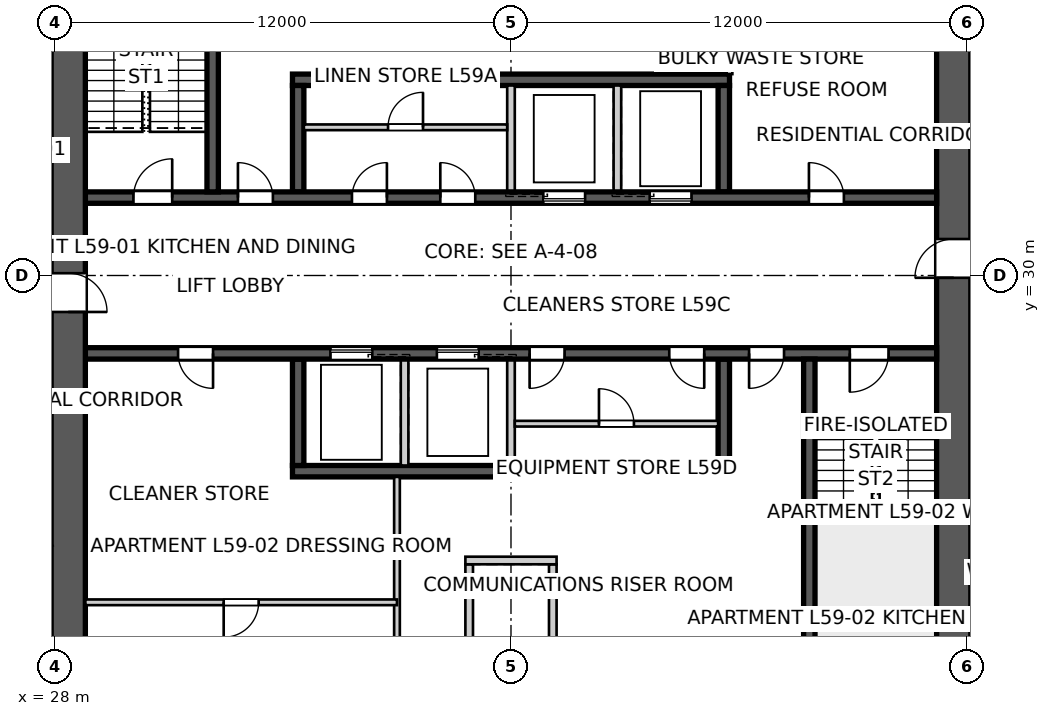
"""IFC4 building model, lengths in metres.
Left out: names, types, materials, properties, quantities, classifications, styles, units other than length and angle.
Written with IfcOpenShell. Run it as: python <this file> out.ifc"""

import sys

from ifc_helpers import new_model, si_unit, direction, frame, frame_2d, origin, place, context, subcontext, project, spatial, polyline, rectangle, outline, extrude, element, fill, save


model = new_model("IFC4")
c1 = context("Model", 3, precision=1e-05, world=origin(), true_north=direction((0.0, 1.0)))
c2 = subcontext(c1, "Body", "Model", "MODEL_VIEW")
j1 = project(units=[si_unit("LENGTHUNIT", "METRE"), si_unit("PLANEANGLEUNIT", "RADIAN")], contexts=[c1])
p1 = place(None, origin())
s1 = spatial("IfcSite", under=j1, at=p1, CompositionType="ELEMENT")
p2 = place(p1, origin())
s2 = spatial("IfcBuilding", under=s1, at=p2, CompositionType="ELEMENT")
p3 = place(p2, frame((0.0, 0.0, 215.0)))
s3 = spatial("IfcBuildingStorey", under=s2, at=p3, CompositionType="ELEMENT", Elevation=215.0)
p4 = place(p3, frame((51.65, 18.8, 0.0), z_axis=(0.0, 0.0, 1.0), x_axis=(0.0, 1.0, 0.0)))
e1 = element("IfcWall", 1, at=p4, inside=s3, PredefinedType="SHEAR", context=c2, shape_type="SweptSolid", body=[
    extrude(outline(polyline([(0.0, -0.45), (22.4, -0.45), (22.4, -0.025), (22.85, -0.025), (22.85, 0.025), (22.4, 0.025), (22.4, 0.45), (0.0, 0.45), (0.0, 0.025), (-0.45, 0.025), (-0.45, -0.025), (0.0, -0.025), (0.0, -0.45)])), origin(), (0.0, 0.0, 1.0), 3.4),
])
p5 = place(p4, frame((11.14, 0.0, 0.0)))
e2 = element("IfcOpeningElement", 2, at=p5, cuts=e1, PredefinedType="OPENING", context=c2, shape_type="SweptSolid", body=[
    extrude(rectangle(XDim=1.02, YDim=2.4, at=frame_2d((0.51, 1.2))), frame((0.0, 0.46, 0.0), z_axis=(0.0, -1.0, 0.0), x_axis=(1.0, 0.0, 0.0)), (0.0, 0.0, 1.0), 0.92),
])
p6 = place(p3, frame((28.35, 41.2, 0.0), z_axis=(0.0, 0.0, 1.0), x_axis=(0.0, -1.0, 0.0)))
e3 = element("IfcWall", 3, at=p6, inside=s3, PredefinedType="SHEAR", context=c2, shape_type="SweptSolid", body=[
    extrude(outline(polyline([(0.0, -0.45), (22.4, -0.45), (22.4, -0.025), (22.85, -0.025), (22.85, 0.025), (22.4, 0.025), (22.4, 0.45), (0.0, 0.45), (0.0, 0.025), (-0.45, 0.025), (-0.45, -0.025), (0.0, -0.025), (0.0, -0.45)])), origin(), (0.0, 0.0, 1.0), 3.4),
])
p7 = place(p6, frame((11.14, 0.0, 0.0)))
e4 = element("IfcOpeningElement", 4, at=p7, cuts=e3, PredefinedType="OPENING", context=c2, shape_type="SweptSolid", body=[
    extrude(rectangle(XDim=1.02, YDim=2.4, at=frame_2d((0.51, 1.2))), frame((0.0, 0.46, 0.0), z_axis=(0.0, -1.0, 0.0), x_axis=(1.0, 0.0, 0.0)), (0.0, 0.0, 1.0), 0.92),
])
p8 = place(p3, frame((28.8, 32.05, 0.0), z_axis=(0.0, 0.0, 1.0), x_axis=(1.0, 0.0, 0.0)))
e5 = element("IfcWall", 5, at=p8, inside=s3, PredefinedType="SHEAR", context=c2, shape_type="SweptSolid", body=[
    extrude(rectangle(XDim=22.4, YDim=0.3, at=frame_2d((11.2, 0.0))), origin(), (0.0, 0.0, 1.0), 3.4),
])
p9 = place(p8, frame((19.04, 0.0, 0.0)))
e6 = element("IfcOpeningElement", 6, at=p9, cuts=e5, PredefinedType="OPENING", context=c2, shape_type="SweptSolid", body=[
    extrude(rectangle(XDim=0.92, YDim=2.1, at=frame_2d((0.46, 1.05))), frame((0.0, 0.16, 0.0), z_axis=(0.0, -1.0, 0.0), x_axis=(1.0, 0.0, 0.0)), (0.0, 0.0, 1.0), 0.32),
])
p10 = place(p8, frame((1.265, 0.0, 0.0)))
e7 = element("IfcOpeningElement", 7, at=p10, cuts=e5, PredefinedType="OPENING", context=c2, shape_type="SweptSolid", body=[
    extrude(rectangle(XDim=1.02, YDim=2.1, at=frame_2d((0.51, 1.05))), frame((0.0, 0.16, 0.0), z_axis=(0.0, -1.0, 0.0), x_axis=(1.0, 0.0, 0.0)), (0.0, 0.0, 1.0), 0.32),
])
p11 = place(p8, frame((4.015, 0.0, 0.0)))
e8 = element("IfcOpeningElement", 8, at=p11, cuts=e5, PredefinedType="OPENING", context=c2, shape_type="SweptSolid", body=[
    extrude(rectangle(XDim=0.92, YDim=2.1, at=frame_2d((0.46, 1.05))), frame((0.0, 0.16, 0.0), z_axis=(0.0, -1.0, 0.0), x_axis=(1.0, 0.0, 0.0)), (0.0, 0.0, 1.0), 0.32),
])
p12 = place(p8, frame((7.015, 0.0, 0.0)))
e9 = element("IfcOpeningElement", 9, at=p12, cuts=e5, PredefinedType="OPENING", context=c2, shape_type="SweptSolid", body=[
    extrude(rectangle(XDim=0.92, YDim=2.1, at=frame_2d((0.46, 1.05))), frame((0.0, 0.16, 0.0), z_axis=(0.0, -1.0, 0.0), x_axis=(1.0, 0.0, 0.0)), (0.0, 0.0, 1.0), 0.32),
])
p13 = place(p8, frame((9.34, 0.0, 0.0)))
e10 = element("IfcOpeningElement", 10, at=p13, cuts=e5, PredefinedType="OPENING", context=c2, shape_type="SweptSolid", body=[
    extrude(rectangle(XDim=0.92, YDim=2.1, at=frame_2d((0.46, 1.05))), frame((0.0, 0.16, 0.0), z_axis=(0.0, -1.0, 0.0), x_axis=(1.0, 0.0, 0.0)), (0.0, 0.0, 1.0), 0.32),
])
p14 = place(p8, frame((12.05, 0.0, 0.0)))
e11 = element("IfcOpeningElement", 11, at=p14, cuts=e5, PredefinedType="OPENING", context=c2, shape_type="SweptSolid", body=[
    extrude(rectangle(XDim=1.1, YDim=2.1, at=frame_2d((0.55, 1.05))), frame((0.0, 0.16, 0.0), z_axis=(0.0, -1.0, 0.0), x_axis=(1.0, 0.0, 0.0)), (0.0, 0.0, 1.0), 0.32),
])
p15 = place(p8, frame((14.85, 0.0, 0.0)))
e12 = element("IfcOpeningElement", 12, at=p15, cuts=e5, PredefinedType="OPENING", context=c2, shape_type="SweptSolid", body=[
    extrude(rectangle(XDim=1.1, YDim=2.1, at=frame_2d((0.55, 1.05))), frame((0.0, 0.16, 0.0), z_axis=(0.0, -1.0, 0.0), x_axis=(1.0, 0.0, 0.0)), (0.0, 0.0, 1.0), 0.32),
])
p16 = place(p3, frame((51.2, 27.95, 0.0), z_axis=(0.0, 0.0, 1.0), x_axis=(-1.0, 0.0, 0.0)))
e13 = element("IfcWall", 13, at=p16, inside=s3, PredefinedType="SHEAR", context=c2, shape_type="SweptSolid", body=[
    extrude(rectangle(XDim=22.4, YDim=0.3, at=frame_2d((11.2, 0.0))), origin(), (0.0, 0.0, 1.0), 3.4),
])
p17 = place(p16, frame((19.04, 0.0, 0.0)))
e14 = element("IfcOpeningElement", 14, at=p17, cuts=e13, PredefinedType="OPENING", context=c2, shape_type="SweptSolid", body=[
    extrude(rectangle(XDim=0.92, YDim=2.1, at=frame_2d((0.46, 1.05))), frame((0.0, 0.16, 0.0), z_axis=(0.0, -1.0, 0.0), x_axis=(1.0, 0.0, 0.0)), (0.0, 0.0, 1.0), 0.32),
])
p18 = place(p16, frame((1.265, 0.0, 0.0)))
e15 = element("IfcOpeningElement", 15, at=p18, cuts=e13, PredefinedType="OPENING", context=c2, shape_type="SweptSolid", body=[
    extrude(rectangle(XDim=1.02, YDim=2.1, at=frame_2d((0.51, 1.05))), frame((0.0, 0.16, 0.0), z_axis=(0.0, -1.0, 0.0), x_axis=(1.0, 0.0, 0.0)), (0.0, 0.0, 1.0), 0.32),
])
p19 = place(p16, frame((4.015, 0.0, 0.0)))
e16 = element("IfcOpeningElement", 16, at=p19, cuts=e13, PredefinedType="OPENING", context=c2, shape_type="SweptSolid", body=[
    extrude(rectangle(XDim=0.92, YDim=2.1, at=frame_2d((0.46, 1.05))), frame((0.0, 0.16, 0.0), z_axis=(0.0, -1.0, 0.0), x_axis=(1.0, 0.0, 0.0)), (0.0, 0.0, 1.0), 0.32),
])
p20 = place(p16, frame((9.79, 0.0, 0.0)))
e17 = element("IfcOpeningElement", 17, at=p20, cuts=e13, PredefinedType="OPENING", context=c2, shape_type="SweptSolid", body=[
    extrude(rectangle(XDim=0.92, YDim=2.1, at=frame_2d((0.46, 1.05))), frame((0.0, 0.16, 0.0), z_axis=(0.0, -1.0, 0.0), x_axis=(1.0, 0.0, 0.0)), (0.0, 0.0, 1.0), 0.32),
])
p21 = place(p16, frame((6.115, 0.0, 0.0)))
e18 = element("IfcOpeningElement", 18, at=p21, cuts=e13, PredefinedType="OPENING", context=c2, shape_type="SweptSolid", body=[
    extrude(rectangle(XDim=0.92, YDim=2.1, at=frame_2d((0.46, 1.05))), frame((0.0, 0.16, 0.0), z_axis=(0.0, -1.0, 0.0), x_axis=(1.0, 0.0, 0.0)), (0.0, 0.0, 1.0), 0.32),
])
p22 = place(p16, frame((12.05, 0.0, 0.0)))
e19 = element("IfcOpeningElement", 19, at=p22, cuts=e13, PredefinedType="OPENING", context=c2, shape_type="SweptSolid", body=[
    extrude(rectangle(XDim=1.1, YDim=2.1, at=frame_2d((0.55, 1.05))), frame((0.0, 0.16, 0.0), z_axis=(0.0, -1.0, 0.0), x_axis=(1.0, 0.0, 0.0)), (0.0, 0.0, 1.0), 0.32),
])
p23 = place(p16, frame((14.85, 0.0, 0.0)))
e20 = element("IfcOpeningElement", 20, at=p23, cuts=e13, PredefinedType="OPENING", context=c2, shape_type="SweptSolid", body=[
    extrude(rectangle(XDim=1.1, YDim=2.1, at=frame_2d((0.55, 1.05))), frame((0.0, 0.16, 0.0), z_axis=(0.0, -1.0, 0.0), x_axis=(1.0, 0.0, 0.0)), (0.0, 0.0, 1.0), 0.32),
])
for number, where, z_axis, x_axis in (
    (21, (34.25, 35.15, 0.0), (0.0, 0.0, 1.0), (1.0, 0.0, 0.0)),
    (22, (45.75, 24.85, 0.0), (0.0, 0.0, 1.0), (-1.0, 0.0, 0.0)),
):
    element("IfcWall", number, at=place(p3, frame(where, z_axis=z_axis, x_axis=x_axis)), inside=s3, PredefinedType="SHEAR", context=c2, shape_type="SweptSolid", body=[
        extrude(rectangle(XDim=11.5, YDim=0.3, at=frame_2d((5.75, 0.0))), origin(), (0.0, 0.0, 1.0), 3.4),
    ])
for number, where, z_axis, x_axis in (
    (23, (34.4, 32.2, 0.0), (0.0, 0.0, 1.0), (0.0, 1.0, 0.0)),
    (24, (45.6, 27.8, 0.0), (0.0, 0.0, 1.0), (0.0, -1.0, 0.0)),
):
    element("IfcWall", number, at=place(p3, frame(where, z_axis=z_axis, x_axis=x_axis)), inside=s3, PredefinedType="SHEAR", context=c2, shape_type="SweptSolid", body=[
        extrude(rectangle(XDim=2.8, YDim=0.3, at=frame_2d((1.4, 0.0))), origin(), (0.0, 0.0, 1.0), 3.4),
    ])
for number, where, z_axis, x_axis in (
    (25, (40.0, 32.2, 0.0), (0.0, 0.0, 1.0), (0.0, 1.0, 0.0)),
    (26, (40.0, 27.8, 0.0), (0.0, 0.0, 1.0), (0.0, -1.0, 0.0)),
    (27, (42.8, 32.2, 0.0), (0.0, 0.0, 1.0), (0.0, 1.0, 0.0)),
    (28, (37.2, 27.8, 0.0), (0.0, 0.0, 1.0), (0.0, -1.0, 0.0)),
):
    element("IfcWall", number, at=place(p3, frame(where, z_axis=z_axis, x_axis=x_axis)), inside=s3, PredefinedType="SOLIDWALL", context=c2, shape_type="SweptSolid", body=[
        extrude(rectangle(XDim=2.8, YDim=0.2, at=frame_2d((1.4, 0.0))), origin(), (0.0, 0.0, 1.0), 3.4),
    ])
for number, where, z_axis, x_axis in (
    (29, (45.6, 32.2, 0.0), (0.0, 0.0, 1.0), (0.0, 1.0, 0.0)),
    (30, (34.4, 27.8, 0.0), (0.0, 0.0, 1.0), (0.0, -1.0, 0.0)),
):
    element("IfcWall", number, at=place(p3, frame(where, z_axis=z_axis, x_axis=x_axis)), inside=s3, PredefinedType="SHEAR", context=c2, shape_type="SweptSolid", body=[
        extrude(rectangle(XDim=2.8, YDim=0.3, at=frame_2d((1.4, 0.0))), origin(), (0.0, 0.0, 1.0), 3.4),
    ])
for number, where, z_axis, x_axis in (
    (31, (32.15, 32.2, 0.0), (0.0, 0.0, 1.0), (0.0, 1.0, 0.0)),
    (32, (47.85, 27.8, 0.0), (0.0, 0.0, 1.0), (0.0, -1.0, 0.0)),
):
    element("IfcWall", number, at=place(p3, frame(where, z_axis=z_axis, x_axis=x_axis)), inside=s3, PredefinedType="SHEAR", context=c2, shape_type="SweptSolid", body=[
        extrude(rectangle(XDim=7.7, YDim=0.3, at=frame_2d((3.85, 0.0))), origin(), (0.0, 0.0, 1.0), 3.4),
    ])
for number, where, z_axis, x_axis in (
    (33, (38.9, 22.4, 0.0), (0.0, 0.0, 1.0), (0.0, -1.0, 0.0)),
    (34, (41.1, 22.4, 0.0), (0.0, 0.0, 1.0), (0.0, -1.0, 0.0)),
):
    element("IfcWall", number, at=place(p3, frame(where, z_axis=z_axis, x_axis=x_axis)), inside=s3, PredefinedType="SOLIDWALL", context=c2, shape_type="SweptSolid", body=[
        extrude(rectangle(XDim=2.0, YDim=0.2, at=frame_2d((1.0, 0.0))), origin(), (0.0, 0.0, 1.0), 3.4),
    ])
p24 = place(p3, frame((38.8, 22.5, 0.0), z_axis=(0.0, 0.0, 1.0), x_axis=(1.0, 0.0, 0.0)))
e35 = element("IfcWall", 35, at=p24, inside=s3, PredefinedType="SOLIDWALL", context=c2, shape_type="SweptSolid", body=[
    extrude(rectangle(XDim=2.4, YDim=0.2, at=frame_2d((1.2, 0.0))), origin(), (0.0, 0.0, 1.0), 3.4),
])
p25 = place(p3, frame((20.514, 18.75, 0.0), z_axis=(0.0, 0.0, 1.0), x_axis=(0.866020489494, 0.500008511703, 0.0)))
e36 = element("IfcWall", 36, at=p25, inside=s3, PredefinedType="PARTITIONING", context=c2, shape_type="SweptSolid", body=[
    extrude(rectangle(XDim=8.496, YDim=0.25, at=frame_2d((4.248, 0.0))), origin(), (0.0, 0.0, 1.0), 3.25),
])
for number, where, z_axis, x_axis in (
    (37, (45.75, 41.2, 0.0), (0.0, 0.0, 1.0), (0.0, -1.0, 0.0)),
    (38, (37.0, 18.8, 0.0), (0.0, 0.0, 1.0), (0.0, 1.0, 0.0)),
):
    element("IfcWall", number, at=place(p3, frame(where, z_axis=z_axis, x_axis=x_axis)), inside=s3, PredefinedType="SOLIDWALL", context=c2, shape_type="SweptSolid", body=[
        extrude(rectangle(XDim=5.9, YDim=0.15, at=frame_2d((2.95, 0.0))), origin(), (0.0, 0.0, 1.0), 3.25),
    ])
p26 = place(p3, frame((37.0, 21.4, 0.0), z_axis=(0.0, 0.0, 1.0), x_axis=(-1.0, 0.0, 0.0)))
e39 = element("IfcWall", 39, at=p26, inside=s3, PredefinedType="SOLIDWALL", context=c2, shape_type="SweptSolid", body=[
    extrude(rectangle(XDim=8.2, YDim=0.15, at=frame_2d((4.1, 0.0))), origin(), (0.0, 0.0, 1.0), 3.25),
])
p27 = place(p26, frame((3.64, 0.0, 0.0)))
e40 = element("IfcOpeningElement", 40, at=p27, cuts=e39, PredefinedType="OPENING", context=c2, shape_type="SweptSolid", body=[
    extrude(rectangle(XDim=0.92, YDim=2.1, at=frame_2d((0.46, 1.05))), frame((0.0, 0.085, 0.0), z_axis=(0.0, -1.0, 0.0), x_axis=(1.0, 0.0, 0.0)), (0.0, 0.0, 1.0), 0.17),
])
p28 = place(p3, frame((34.55, 33.9, 0.0), z_axis=(0.0, 0.0, 1.0), x_axis=(1.0, 0.0, 0.0)))
e41 = element("IfcWall", 41, at=p28, inside=s3, PredefinedType="SOLIDWALL", context=c2, shape_type="SweptSolid", body=[
    extrude(rectangle(XDim=5.35, YDim=0.15, at=frame_2d((2.675, 0.0))), origin(), (0.0, 0.0, 1.0), 3.25),
])
p29 = place(p28, frame((2.215, 0.0, 0.0)))
e42 = element("IfcOpeningElement", 42, at=p29, cuts=e41, PredefinedType="OPENING", context=c2, shape_type="SweptSolid", body=[
    extrude(rectangle(XDim=0.92, YDim=2.1, at=frame_2d((0.46, 1.05))), frame((0.0, 0.085, 0.0), z_axis=(0.0, -1.0, 0.0), x_axis=(1.0, 0.0, 0.0)), (0.0, 0.0, 1.0), 0.17),
])
p30 = place(p3, frame((40.1, 26.1, 0.0), z_axis=(0.0, 0.0, 1.0), x_axis=(1.0, 0.0, 0.0)))
e43 = element("IfcWall", 43, at=p30, inside=s3, PredefinedType="SOLIDWALL", context=c2, shape_type="SweptSolid", body=[
    extrude(rectangle(XDim=5.35, YDim=0.15, at=frame_2d((2.675, 0.0))), origin(), (0.0, 0.0, 1.0), 3.25),
])
p31 = place(p30, frame((2.215, 0.0, 0.0)))
e44 = element("IfcOpeningElement", 44, at=p31, cuts=e43, PredefinedType="OPENING", context=c2, shape_type="SweptSolid", body=[
    extrude(rectangle(XDim=0.92, YDim=2.1, at=frame_2d((0.46, 1.05))), frame((0.0, 0.085, 0.0), z_axis=(0.0, -1.0, 0.0), x_axis=(1.0, 0.0, 0.0)), (0.0, 0.0, 1.0), 0.17),
])
p32 = place(p9, origin())
e45 = element("IfcDoor", 45, at=p32, inside=s3, OperationType="SINGLE_SWING_LEFT", PredefinedType="DOOR", context=c2, shape_type="SweptSolid", body=[
    extrude(rectangle(XDim=0.92, YDim=2.1, at=frame_2d((0.46, 1.05))), frame((0.0, 0.025, 0.0), z_axis=(0.0, -1.0, 0.0), x_axis=(1.0, 0.0, 0.0)), (0.0, 0.0, 1.0), 0.05),
])
fill(e6, e45)
p33 = place(p17, origin())
e46 = element("IfcDoor", 46, at=p33, inside=s3, OperationType="SINGLE_SWING_LEFT", PredefinedType="DOOR", context=c2, shape_type="SweptSolid", body=[
    extrude(rectangle(XDim=0.92, YDim=2.1, at=frame_2d((0.46, 1.05))), frame((0.0, 0.025, 0.0), z_axis=(0.0, -1.0, 0.0), x_axis=(1.0, 0.0, 0.0)), (0.0, 0.0, 1.0), 0.05),
])
fill(e14, e46)
p34 = place(p18, origin())
e47 = element("IfcDoor", 47, at=p34, inside=s3, OperationType="SINGLE_SWING_RIGHT", PredefinedType="DOOR", context=c2, shape_type="SweptSolid", body=[
    extrude(rectangle(XDim=1.02, YDim=2.1, at=frame_2d((0.51, 1.05))), frame((0.0, 0.025, 0.0), z_axis=(0.0, -1.0, 0.0), x_axis=(1.0, 0.0, 0.0)), (0.0, 0.0, 1.0), 0.05),
])
fill(e15, e47)
p35 = place(p10, origin())
e48 = element("IfcDoor", 48, at=p35, inside=s3, OperationType="SINGLE_SWING_RIGHT", PredefinedType="DOOR", context=c2, shape_type="SweptSolid", body=[
    extrude(rectangle(XDim=1.02, YDim=2.1, at=frame_2d((0.51, 1.05))), frame((0.0, 0.025, 0.0), z_axis=(0.0, -1.0, 0.0), x_axis=(1.0, 0.0, 0.0)), (0.0, 0.0, 1.0), 0.05),
])
fill(e7, e48)
p36 = place(p11, origin())
e49 = element("IfcDoor", 49, at=p36, inside=s3, OperationType="SINGLE_SWING_LEFT", PredefinedType="DOOR", context=c2, shape_type="SweptSolid", body=[
    extrude(rectangle(XDim=0.92, YDim=2.1, at=frame_2d((0.46, 1.05))), frame((0.0, 0.025, 0.0), z_axis=(0.0, -1.0, 0.0), x_axis=(1.0, 0.0, 0.0)), (0.0, 0.0, 1.0), 0.05),
])
fill(e8, e49)
p37 = place(p19, origin())
e50 = element("IfcDoor", 50, at=p37, inside=s3, OperationType="SINGLE_SWING_RIGHT", PredefinedType="DOOR", context=c2, shape_type="SweptSolid", body=[
    extrude(rectangle(XDim=0.92, YDim=2.1, at=frame_2d((0.46, 1.05))), frame((0.0, 0.025, 0.0), z_axis=(0.0, -1.0, 0.0), x_axis=(1.0, 0.0, 0.0)), (0.0, 0.0, 1.0), 0.05),
])
fill(e16, e50)
p38 = place(p27, origin())
e51 = element("IfcDoor", 51, at=p38, inside=s3, OperationType="SINGLE_SWING_RIGHT", PredefinedType="DOOR", context=c2, shape_type="SweptSolid", body=[
    extrude(rectangle(XDim=0.92, YDim=2.1, at=frame_2d((0.46, 1.05))), frame((0.0, 0.025, 0.0), z_axis=(0.0, -1.0, 0.0), x_axis=(1.0, 0.0, 0.0)), (0.0, 0.0, 1.0), 0.05),
])
fill(e40, e51)
p39 = place(p12, origin())
e52 = element("IfcDoor", 52, at=p39, inside=s3, OperationType="SINGLE_SWING_RIGHT", PredefinedType="DOOR", context=c2, shape_type="SweptSolid", body=[
    extrude(rectangle(XDim=0.92, YDim=2.1, at=frame_2d((0.46, 1.05))), frame((0.0, 0.025, 0.0), z_axis=(0.0, -1.0, 0.0), x_axis=(1.0, 0.0, 0.0)), (0.0, 0.0, 1.0), 0.05),
])
fill(e9, e52)
p40 = place(p13, origin())
e53 = element("IfcDoor", 53, at=p40, inside=s3, OperationType="SINGLE_SWING_LEFT", PredefinedType="DOOR", context=c2, shape_type="SweptSolid", body=[
    extrude(rectangle(XDim=0.92, YDim=2.1, at=frame_2d((0.46, 1.05))), frame((0.0, 0.025, 0.0), z_axis=(0.0, -1.0, 0.0), x_axis=(1.0, 0.0, 0.0)), (0.0, 0.0, 1.0), 0.05),
])
fill(e10, e53)
p41 = place(p29, origin())
e54 = element("IfcDoor", 54, at=p41, inside=s3, OperationType="SINGLE_SWING_RIGHT", PredefinedType="DOOR", context=c2, shape_type="SweptSolid", body=[
    extrude(rectangle(XDim=0.92, YDim=2.1, at=frame_2d((0.46, 1.05))), frame((0.0, 0.025, 0.0), z_axis=(0.0, -1.0, 0.0), x_axis=(1.0, 0.0, 0.0)), (0.0, 0.0, 1.0), 0.05),
])
fill(e42, e54)
p42 = place(p20, origin())
e55 = element("IfcDoor", 55, at=p42, inside=s3, OperationType="SINGLE_SWING_RIGHT", PredefinedType="DOOR", context=c2, shape_type="SweptSolid", body=[
    extrude(rectangle(XDim=0.92, YDim=2.1, at=frame_2d((0.46, 1.05))), frame((0.0, 0.025, 0.0), z_axis=(0.0, -1.0, 0.0), x_axis=(1.0, 0.0, 0.0)), (0.0, 0.0, 1.0), 0.05),
])
fill(e17, e55)
p43 = place(p21, origin())
e56 = element("IfcDoor", 56, at=p43, inside=s3, OperationType="SINGLE_SWING_LEFT", PredefinedType="DOOR", context=c2, shape_type="SweptSolid", body=[
    extrude(rectangle(XDim=0.92, YDim=2.1, at=frame_2d((0.46, 1.05))), frame((0.0, 0.025, 0.0), z_axis=(0.0, -1.0, 0.0), x_axis=(1.0, 0.0, 0.0)), (0.0, 0.0, 1.0), 0.05),
])
fill(e18, e56)
p44 = place(p31, origin())
e57 = element("IfcDoor", 57, at=p44, inside=s3, OperationType="SINGLE_SWING_LEFT", PredefinedType="DOOR", context=c2, shape_type="SweptSolid", body=[
    extrude(rectangle(XDim=0.92, YDim=2.1, at=frame_2d((0.46, 1.05))), frame((0.0, 0.025, 0.0), z_axis=(0.0, -1.0, 0.0), x_axis=(1.0, 0.0, 0.0)), (0.0, 0.0, 1.0), 0.05),
])
fill(e44, e57)
p45 = place(p5, origin())
e58 = element("IfcDoor", 58, at=p45, inside=s3, OperationType="SINGLE_SWING_LEFT", PredefinedType="DOOR", context=c2, shape_type="SweptSolid", body=[
    extrude(rectangle(XDim=1.02, YDim=2.4, at=frame_2d((0.51, 1.2))), frame((0.0, 0.025, 0.0), z_axis=(0.0, -1.0, 0.0), x_axis=(1.0, 0.0, 0.0)), (0.0, 0.0, 1.0), 0.05),
])
fill(e2, e58)
p46 = place(p7, origin())
e59 = element("IfcDoor", 59, at=p46, inside=s3, OperationType="SINGLE_SWING_RIGHT", PredefinedType="DOOR", context=c2, shape_type="SweptSolid", body=[
    extrude(rectangle(XDim=1.02, YDim=2.4, at=frame_2d((0.51, 1.2))), frame((0.0, 0.025, 0.0), z_axis=(0.0, -1.0, 0.0), x_axis=(1.0, 0.0, 0.0)), (0.0, 0.0, 1.0), 0.05),
])
fill(e4, e59)
p47 = place(p14, origin())
e60 = element("IfcDoor", 60, at=p47, inside=s3, OperationType="SLIDING_TO_LEFT", PredefinedType="DOOR", context=c2, shape_type="SweptSolid", body=[
    extrude(rectangle(XDim=1.1, YDim=2.1, at=frame_2d((0.55, 1.05))), frame((0.0, 0.025, 0.0), z_axis=(0.0, -1.0, 0.0), x_axis=(1.0, 0.0, 0.0)), (0.0, 0.0, 1.0), 0.05),
])
fill(e11, e60)
p48 = place(p22, origin())
e61 = element("IfcDoor", 61, at=p48, inside=s3, OperationType="SLIDING_TO_LEFT", PredefinedType="DOOR", context=c2, shape_type="SweptSolid", body=[
    extrude(rectangle(XDim=1.1, YDim=2.1, at=frame_2d((0.55, 1.05))), frame((0.0, 0.025, 0.0), z_axis=(0.0, -1.0, 0.0), x_axis=(1.0, 0.0, 0.0)), (0.0, 0.0, 1.0), 0.05),
])
fill(e19, e61)
p49 = place(p15, origin())
e62 = element("IfcDoor", 62, at=p49, inside=s3, OperationType="SLIDING_TO_LEFT", PredefinedType="DOOR", context=c2, shape_type="SweptSolid", body=[
    extrude(rectangle(XDim=1.1, YDim=2.1, at=frame_2d((0.55, 1.05))), frame((0.0, 0.025, 0.0), z_axis=(0.0, -1.0, 0.0), x_axis=(1.0, 0.0, 0.0)), (0.0, 0.0, 1.0), 0.05),
])
fill(e12, e62)
p50 = place(p23, origin())
e63 = element("IfcDoor", 63, at=p50, inside=s3, OperationType="SLIDING_TO_LEFT", PredefinedType="DOOR", context=c2, shape_type="SweptSolid", body=[
    extrude(rectangle(XDim=1.1, YDim=2.1, at=frame_2d((0.55, 1.05))), frame((0.0, 0.025, 0.0), z_axis=(0.0, -1.0, 0.0), x_axis=(1.0, 0.0, 0.0)), (0.0, 0.0, 1.0), 0.05),
])
fill(e20, e63)
save(model, sys.argv[1])
